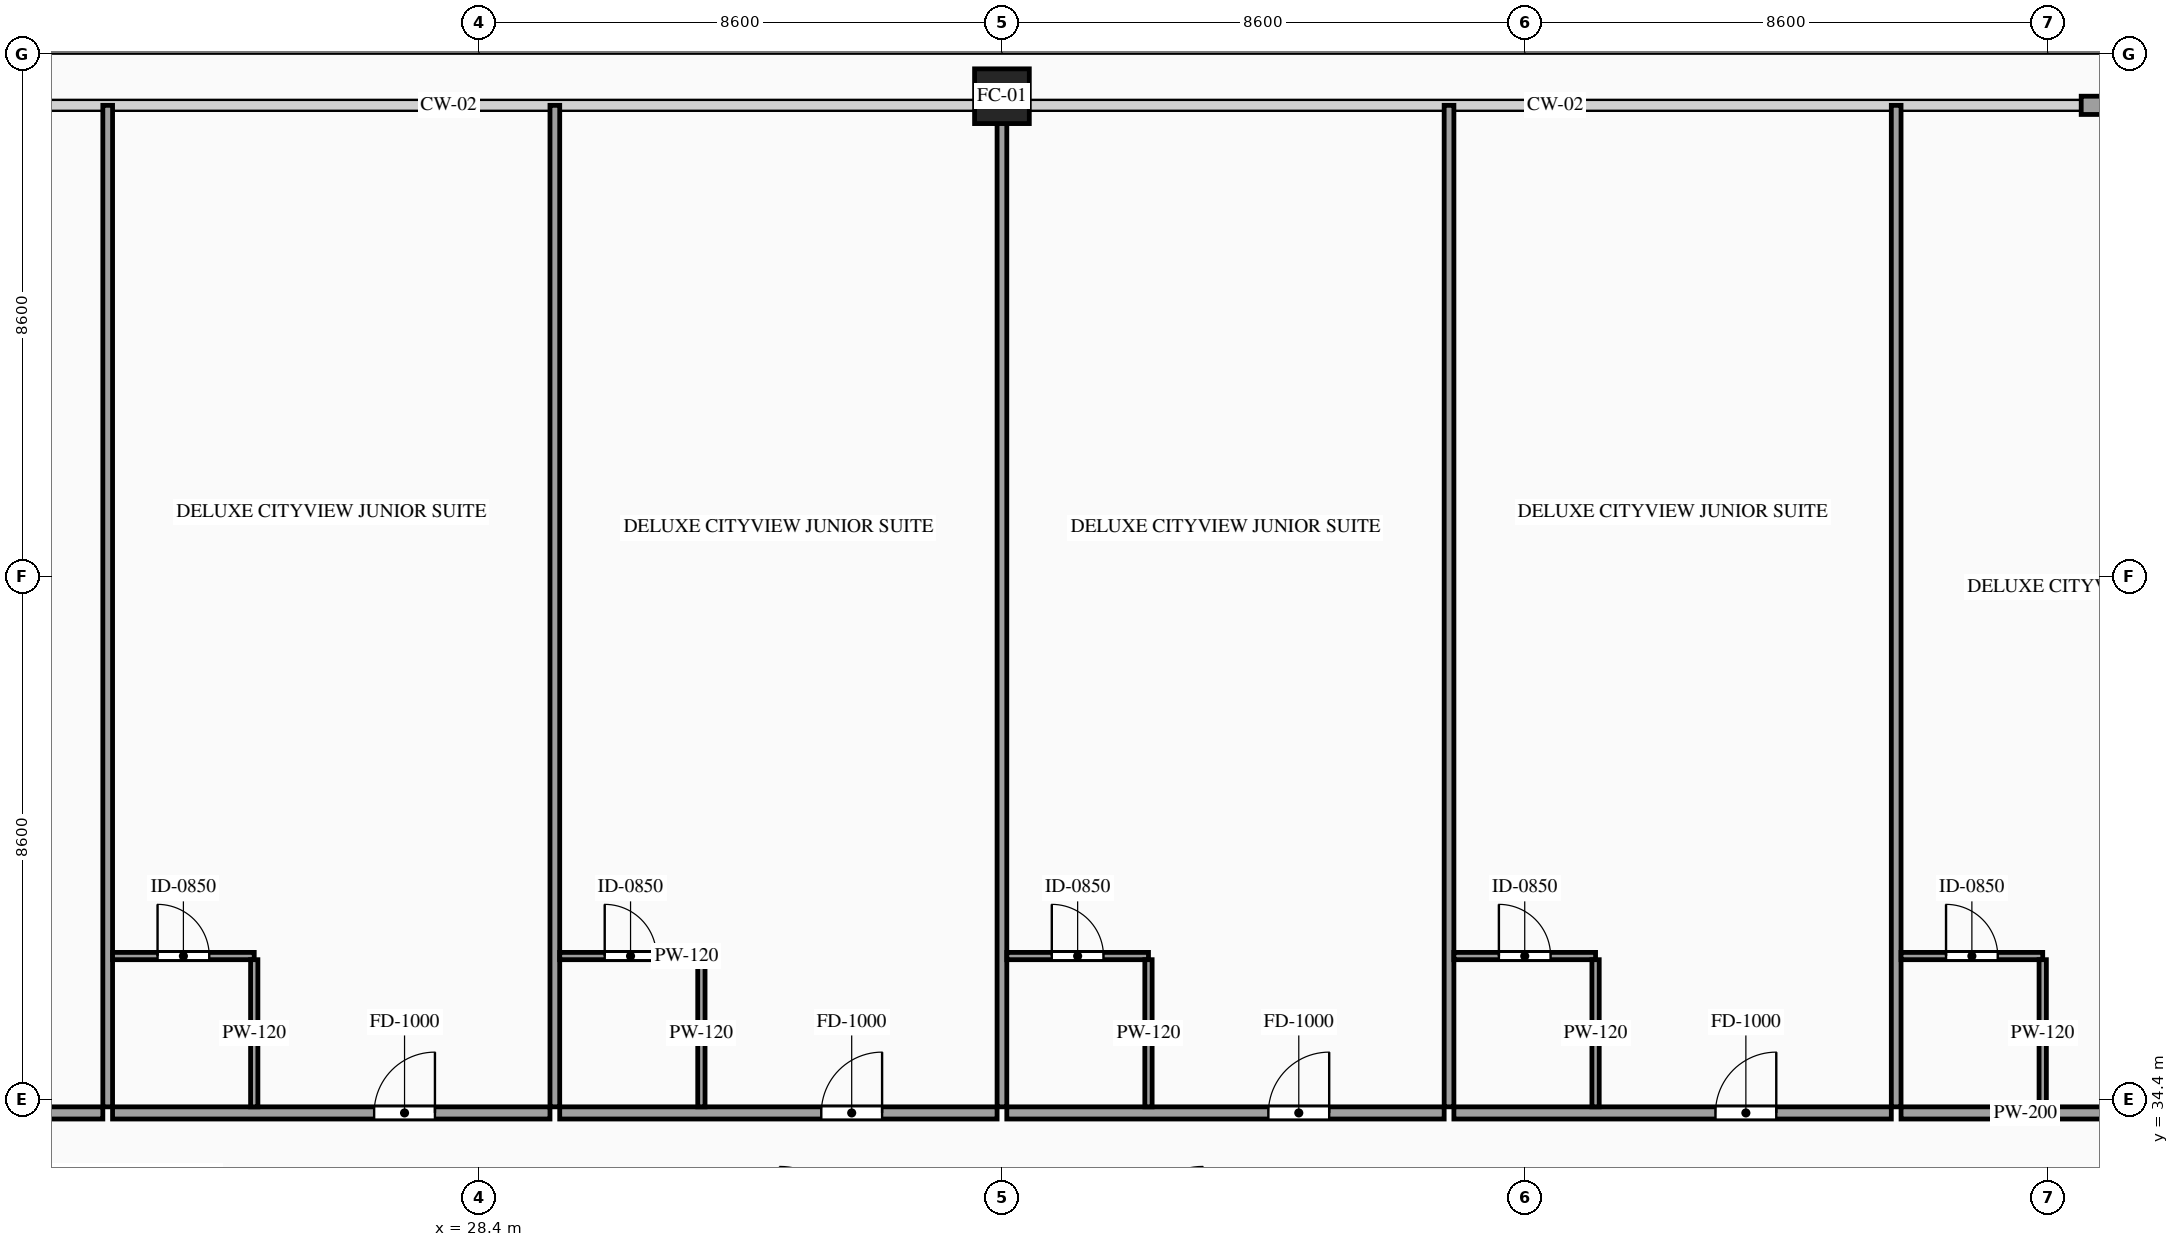
"""IFC4 building model, lengths in metres.
Left out: names, types, materials, properties, quantities, classifications, styles, units other than length and angle.
Written with IfcOpenShell. Run it as: python <this file> out.ifc"""

import sys

from ifc_helpers import new_model, si_unit, direction, frame, frame_2d, origin, origin_2d, place, context, subcontext, project, spatial, rectangle, hollow_rectangle, extrude, source, transform, mapped, element, fill, save


model = new_model("IFC4")
c1 = context("Model", 3, precision=1e-05, world=origin(), true_north=direction((0.0, 1.0)))
c2 = subcontext(c1, "Body", "Model", "MODEL_VIEW")
j1 = project(units=[si_unit("LENGTHUNIT", "METRE"), si_unit("PLANEANGLEUNIT", "RADIAN")], contexts=[c1])
p1 = place(None, origin())
s1 = spatial("IfcSite", under=j1, at=p1, CompositionType="ELEMENT")
p2 = place(p1, origin())
s2 = spatial("IfcBuilding", under=s1, at=p2, CompositionType="ELEMENT")
p3 = place(p2, frame((0.0, 0.0, 37.8)))
s3 = spatial("IfcBuildingStorey", under=s2, at=p3, CompositionType="ELEMENT", Elevation=37.8)
m1 = source(origin(), c2, "Body", "SweptSolid", [
    extrude(hollow_rectangle(XDim=0.9, YDim=0.9, WallThickness=0.042, at=origin_2d()), origin(), (0.0, 0.0, 1.0), 3.6),
])
p4 = place(p3, frame((37.0, 50.9, 0.0), z_axis=(0.0, 0.0, 1.0), x_axis=(1.0, 0.0, 0.0)))
e1 = element("IfcColumn", 1, at=p4, inside=s3, PredefinedType="COLUMN", context=c2, shape_type="MappedRepresentation", body=[
    mapped(m1, transform((0.0, 0.0, 0.0), scale=1.0)),
])
m2 = source(origin(), c2, "Body", "SweptSolid", [
    extrude(rectangle(XDim=2.85, YDim=0.3, at=frame_2d((1.425, 0.0))), origin(), (0.0, 0.0, 1.0), 2.715),
])
p5 = place(p3, frame((54.75, 50.75, 0.0), z_axis=(0.0, 0.0, 1.0), x_axis=(1.0, 0.0, 0.0)))
e2 = element("IfcWall", 2, at=p5, inside=s3, PredefinedType="SOLIDWALL", context=c2, shape_type="MappedRepresentation", body=[
    mapped(m2, transform((0.0, 0.0, 0.0), scale=1.0)),
])
p6 = place(p3, frame((14.94, 34.18, 0.0), z_axis=(0.0, 0.0, 1.0), x_axis=(1.0, 0.0, 0.0)))
e3 = element("IfcWall", 3, at=p6, inside=s3, PredefinedType="PARTITIONING", context=c2, shape_type="SweptSolid", body=[
    extrude(rectangle(XDim=7.273, YDim=0.2, at=frame_2d((3.636, 0.0))), origin(), (0.0, 0.0, 1.0), 3.32),
])
p7 = place(p6, frame((4.342, 0.0, 0.0)))
e4 = element("IfcOpeningElement", 4, at=p7, cuts=e3, PredefinedType="OPENING", context=c2, shape_type="SweptSolid", body=[
    extrude(rectangle(XDim=1.0, YDim=2.2, at=frame_2d((0.5, 1.1))), frame((0.0, 0.115, 0.0), z_axis=(0.0, -1.0, 0.0), x_axis=(1.0, 0.0, 0.0)), (0.0, 0.0, 1.0), 0.23),
])
m3 = source(origin(), c2, "Body", "SweptSolid", [
    extrude(rectangle(XDim=16.47, YDim=0.16, at=frame_2d((8.235, 0.0))), origin(), (0.0, 0.0, 1.0), 3.32),
])
p8 = place(p3, frame((22.293, 34.28, 0.0), z_axis=(0.0, 0.0, 1.0), x_axis=(0.0, 1.0, 0.0)))
e5 = element("IfcWall", 5, at=p8, inside=s3, PredefinedType="PARTITIONING", context=c2, shape_type="MappedRepresentation", body=[
    mapped(m3, transform((0.0, 0.0, 0.0), scale=1.0)),
])
p9 = place(p3, frame((22.373, 34.18, 0.0), z_axis=(0.0, 0.0, 1.0), x_axis=(1.0, 0.0, 0.0)))
e6 = element("IfcWall", 6, at=p9, inside=s3, PredefinedType="PARTITIONING", context=c2, shape_type="SweptSolid", body=[
    extrude(rectangle(XDim=7.194, YDim=0.2, at=frame_2d((3.597, 0.0))), origin(), (0.0, 0.0, 1.0), 3.32),
])
p10 = place(p9, frame((4.302, 0.0, 0.0)))
e7 = element("IfcOpeningElement", 7, at=p10, cuts=e6, PredefinedType="OPENING", context=c2, shape_type="SweptSolid", body=[
    extrude(rectangle(XDim=1.0, YDim=2.2, at=frame_2d((0.5, 1.1))), frame((0.0, 0.115, 0.0), z_axis=(0.0, -1.0, 0.0), x_axis=(1.0, 0.0, 0.0)), (0.0, 0.0, 1.0), 0.23),
])
p11 = place(p3, frame((29.647, 34.28, 0.0), z_axis=(0.0, 0.0, 1.0), x_axis=(0.0, 1.0, 0.0)))
e8 = element("IfcWall", 8, at=p11, inside=s3, PredefinedType="PARTITIONING", context=c2, shape_type="MappedRepresentation", body=[
    mapped(m3, transform((0.0, 0.0, 0.0), scale=1.0)),
])
p12 = place(p3, frame((22.373, 36.76, 0.0), z_axis=(0.0, 0.0, 1.0), x_axis=(1.0, 0.0, 0.0)))
e9 = element("IfcWall", 9, at=p12, inside=s3, PredefinedType="PARTITIONING", context=c2, shape_type="SweptSolid", body=[
    extrude(rectangle(XDim=2.33, YDim=0.12, at=frame_2d((1.165, 0.0))), origin(), (0.0, 0.0, 1.0), 3.32),
])
p13 = place(p12, frame((0.74, 0.0, 0.0)))
e10 = element("IfcOpeningElement", 10, at=p13, cuts=e9, PredefinedType="OPENING", context=c2, shape_type="SweptSolid", body=[
    extrude(rectangle(XDim=0.85, YDim=2.1, at=frame_2d((0.425, 1.05))), frame((0.0, 0.075, 0.0), z_axis=(0.0, -1.0, 0.0), x_axis=(1.0, 0.0, 0.0)), (0.0, 0.0, 1.0), 0.15),
])
m4 = source(origin(), c2, "Body", "SweptSolid", [
    extrude(rectangle(XDim=2.42, YDim=0.12, at=frame_2d((1.21, 0.0))), origin(), (0.0, 0.0, 1.0), 3.32),
])
p14 = place(p3, frame((24.703, 34.28, 0.0), z_axis=(0.0, 0.0, 1.0), x_axis=(0.0, 1.0, 0.0)))
e11 = element("IfcWall", 11, at=p14, inside=s3, PredefinedType="PARTITIONING", context=c2, shape_type="MappedRepresentation", body=[
    mapped(m4, transform((0.0, 0.0, 0.0), scale=1.0)),
])
p15 = place(p3, frame((29.727, 34.18, 0.0), z_axis=(0.0, 0.0, 1.0), x_axis=(1.0, 0.0, 0.0)))
e12 = element("IfcWall", 12, at=p15, inside=s3, PredefinedType="PARTITIONING", context=c2, shape_type="SweptSolid", body=[
    extrude(rectangle(XDim=7.193, YDim=0.2, at=frame_2d((3.596, 0.0))), origin(), (0.0, 0.0, 1.0), 3.32),
])
p16 = place(p15, frame((4.302, 0.0, 0.0)))
e13 = element("IfcOpeningElement", 13, at=p16, cuts=e12, PredefinedType="OPENING", context=c2, shape_type="SweptSolid", body=[
    extrude(rectangle(XDim=1.0, YDim=2.2, at=frame_2d((0.5, 1.1))), frame((0.0, 0.115, 0.0), z_axis=(0.0, -1.0, 0.0), x_axis=(1.0, 0.0, 0.0)), (0.0, 0.0, 1.0), 0.23),
])
m5 = source(origin(), c2, "Body", "SweptSolid", [
    extrude(rectangle(XDim=16.47, YDim=0.16, at=frame_2d((8.235, 0.0))), origin(), (0.0, 0.0, 1.0), 2.515),
])
p17 = place(p3, frame((37.0, 34.28, 0.0), z_axis=(0.0, 0.0, 1.0), x_axis=(0.0, 1.0, 0.0)))
e14 = element("IfcWall", 14, at=p17, inside=s3, PredefinedType="PARTITIONING", context=c2, shape_type="MappedRepresentation", body=[
    mapped(m5, transform((0.0, 0.0, 0.0), scale=1.0)),
])
p18 = place(p3, frame((29.727, 36.76, 0.0), z_axis=(0.0, 0.0, 1.0), x_axis=(1.0, 0.0, 0.0)))
e15 = element("IfcWall", 15, at=p18, inside=s3, PredefinedType="PARTITIONING", context=c2, shape_type="SweptSolid", body=[
    extrude(rectangle(XDim=2.33, YDim=0.12, at=frame_2d((1.165, 0.0))), origin(), (0.0, 0.0, 1.0), 3.32),
])
p19 = place(p18, frame((0.74, 0.0, 0.0)))
e16 = element("IfcOpeningElement", 16, at=p19, cuts=e15, PredefinedType="OPENING", context=c2, shape_type="SweptSolid", body=[
    extrude(rectangle(XDim=0.85, YDim=2.1, at=frame_2d((0.425, 1.05))), frame((0.0, 0.075, 0.0), z_axis=(0.0, -1.0, 0.0), x_axis=(1.0, 0.0, 0.0)), (0.0, 0.0, 1.0), 0.15),
])
p20 = place(p3, frame((32.057, 34.28, 0.0), z_axis=(0.0, 0.0, 1.0), x_axis=(0.0, 1.0, 0.0)))
e17 = element("IfcWall", 17, at=p20, inside=s3, PredefinedType="PARTITIONING", context=c2, shape_type="MappedRepresentation", body=[
    mapped(m4, transform((0.0, 0.0, 0.0), scale=1.0)),
])
p21 = place(p3, frame((37.08, 34.18, 0.0), z_axis=(0.0, 0.0, 1.0), x_axis=(1.0, 0.0, 0.0)))
e18 = element("IfcWall", 18, at=p21, inside=s3, PredefinedType="PARTITIONING", context=c2, shape_type="SweptSolid", body=[
    extrude(rectangle(XDim=7.193, YDim=0.2, at=frame_2d((3.596, 0.0))), origin(), (0.0, 0.0, 1.0), 3.32),
])
p22 = place(p21, frame((4.302, 0.0, 0.0)))
e19 = element("IfcOpeningElement", 19, at=p22, cuts=e18, PredefinedType="OPENING", context=c2, shape_type="SweptSolid", body=[
    extrude(rectangle(XDim=1.0, YDim=2.2, at=frame_2d((0.5, 1.1))), frame((0.0, 0.115, 0.0), z_axis=(0.0, -1.0, 0.0), x_axis=(1.0, 0.0, 0.0)), (0.0, 0.0, 1.0), 0.23),
])
p23 = place(p3, frame((44.353, 34.28, 0.0), z_axis=(0.0, 0.0, 1.0), x_axis=(0.0, 1.0, 0.0)))
e20 = element("IfcWall", 20, at=p23, inside=s3, PredefinedType="PARTITIONING", context=c2, shape_type="MappedRepresentation", body=[
    mapped(m3, transform((0.0, 0.0, 0.0), scale=1.0)),
])
p24 = place(p3, frame((37.08, 36.76, 0.0), z_axis=(0.0, 0.0, 1.0), x_axis=(1.0, 0.0, 0.0)))
e21 = element("IfcWall", 21, at=p24, inside=s3, PredefinedType="PARTITIONING", context=c2, shape_type="SweptSolid", body=[
    extrude(rectangle(XDim=2.33, YDim=0.12, at=frame_2d((1.165, 0.0))), origin(), (0.0, 0.0, 1.0), 3.32),
])
p25 = place(p24, frame((0.74, 0.0, 0.0)))
e22 = element("IfcOpeningElement", 22, at=p25, cuts=e21, PredefinedType="OPENING", context=c2, shape_type="SweptSolid", body=[
    extrude(rectangle(XDim=0.85, YDim=2.1, at=frame_2d((0.425, 1.05))), frame((0.0, 0.075, 0.0), z_axis=(0.0, -1.0, 0.0), x_axis=(1.0, 0.0, 0.0)), (0.0, 0.0, 1.0), 0.15),
])
p26 = place(p3, frame((39.41, 34.28, 0.0), z_axis=(0.0, 0.0, 1.0), x_axis=(0.0, 1.0, 0.0)))
e23 = element("IfcWall", 23, at=p26, inside=s3, PredefinedType="PARTITIONING", context=c2, shape_type="MappedRepresentation", body=[
    mapped(m4, transform((0.0, 0.0, 0.0), scale=1.0)),
])
p27 = place(p3, frame((44.433, 34.18, 0.0), z_axis=(0.0, 0.0, 1.0), x_axis=(1.0, 0.0, 0.0)))
e24 = element("IfcWall", 24, at=p27, inside=s3, PredefinedType="PARTITIONING", context=c2, shape_type="SweptSolid", body=[
    extrude(rectangle(XDim=7.194, YDim=0.2, at=frame_2d((3.597, 0.0))), origin(), (0.0, 0.0, 1.0), 3.32),
])
p28 = place(p27, frame((4.302, 0.0, 0.0)))
e25 = element("IfcOpeningElement", 25, at=p28, cuts=e24, PredefinedType="OPENING", context=c2, shape_type="SweptSolid", body=[
    extrude(rectangle(XDim=1.0, YDim=2.2, at=frame_2d((0.5, 1.1))), frame((0.0, 0.115, 0.0), z_axis=(0.0, -1.0, 0.0), x_axis=(1.0, 0.0, 0.0)), (0.0, 0.0, 1.0), 0.23),
])
p29 = place(p3, frame((51.707, 34.28, 0.0), z_axis=(0.0, 0.0, 1.0), x_axis=(0.0, 1.0, 0.0)))
e26 = element("IfcWall", 26, at=p29, inside=s3, PredefinedType="PARTITIONING", context=c2, shape_type="MappedRepresentation", body=[
    mapped(m3, transform((0.0, 0.0, 0.0), scale=1.0)),
])
p30 = place(p3, frame((44.433, 36.76, 0.0), z_axis=(0.0, 0.0, 1.0), x_axis=(1.0, 0.0, 0.0)))
e27 = element("IfcWall", 27, at=p30, inside=s3, PredefinedType="PARTITIONING", context=c2, shape_type="SweptSolid", body=[
    extrude(rectangle(XDim=2.33, YDim=0.12, at=frame_2d((1.165, 0.0))), origin(), (0.0, 0.0, 1.0), 3.32),
])
p31 = place(p30, frame((0.74, 0.0, 0.0)))
e28 = element("IfcOpeningElement", 28, at=p31, cuts=e27, PredefinedType="OPENING", context=c2, shape_type="SweptSolid", body=[
    extrude(rectangle(XDim=0.85, YDim=2.1, at=frame_2d((0.425, 1.05))), frame((0.0, 0.075, 0.0), z_axis=(0.0, -1.0, 0.0), x_axis=(1.0, 0.0, 0.0)), (0.0, 0.0, 1.0), 0.15),
])
p32 = place(p3, frame((46.763, 34.28, 0.0), z_axis=(0.0, 0.0, 1.0), x_axis=(0.0, 1.0, 0.0)))
e29 = element("IfcWall", 29, at=p32, inside=s3, PredefinedType="PARTITIONING", context=c2, shape_type="MappedRepresentation", body=[
    mapped(m4, transform((0.0, 0.0, 0.0), scale=1.0)),
])
p33 = place(p3, frame((51.787, 34.18, 0.0), z_axis=(0.0, 0.0, 1.0), x_axis=(1.0, 0.0, 0.0)))
e30 = element("IfcWall", 30, at=p33, inside=s3, PredefinedType="PARTITIONING", context=c2, shape_type="SweptSolid", body=[
    extrude(rectangle(XDim=7.273, YDim=0.2, at=frame_2d((3.636, 0.0))), origin(), (0.0, 0.0, 1.0), 3.32),
])
p34 = place(p33, frame((4.342, 0.0, 0.0)))
e31 = element("IfcOpeningElement", 31, at=p34, cuts=e30, PredefinedType="OPENING", context=c2, shape_type="SweptSolid", body=[
    extrude(rectangle(XDim=1.0, YDim=2.2, at=frame_2d((0.5, 1.1))), frame((0.0, 0.115, 0.0), z_axis=(0.0, -1.0, 0.0), x_axis=(1.0, 0.0, 0.0)), (0.0, 0.0, 1.0), 0.23),
])
p35 = place(p3, frame((51.787, 36.76, 0.0), z_axis=(0.0, 0.0, 1.0), x_axis=(1.0, 0.0, 0.0)))
e32 = element("IfcWall", 32, at=p35, inside=s3, PredefinedType="PARTITIONING", context=c2, shape_type="SweptSolid", body=[
    extrude(rectangle(XDim=2.33, YDim=0.12, at=frame_2d((1.165, 0.0))), origin(), (0.0, 0.0, 1.0), 3.32),
])
p36 = place(p35, frame((0.74, 0.0, 0.0)))
e33 = element("IfcOpeningElement", 33, at=p36, cuts=e32, PredefinedType="OPENING", context=c2, shape_type="SweptSolid", body=[
    extrude(rectangle(XDim=0.85, YDim=2.1, at=frame_2d((0.425, 1.05))), frame((0.0, 0.075, 0.0), z_axis=(0.0, -1.0, 0.0), x_axis=(1.0, 0.0, 0.0)), (0.0, 0.0, 1.0), 0.15),
])
p37 = place(p3, frame((54.117, 34.28, 0.0), z_axis=(0.0, 0.0, 1.0), x_axis=(0.0, 1.0, 0.0)))
e34 = element("IfcWall", 34, at=p37, inside=s3, PredefinedType="PARTITIONING", context=c2, shape_type="MappedRepresentation", body=[
    mapped(m4, transform((0.0, 0.0, 0.0), scale=1.0)),
])
m6 = source(origin(), c2, "Body", "SweptSolid", [
    extrude(rectangle(XDim=1.0, YDim=2.2, at=frame_2d((0.5, 1.1))), frame((0.0, 0.025, 0.0), z_axis=(0.0, -1.0, 0.0), x_axis=(1.0, 0.0, 0.0)), (0.0, 0.0, 1.0), 0.05),
])
p38 = place(p10, origin())
e35 = element("IfcDoor", 35, at=p38, inside=s3, OperationType="SINGLE_SWING_RIGHT", PredefinedType="DOOR", context=c2, shape_type="MappedRepresentation", body=[
    mapped(m6, transform((0.0, 0.0, 0.0), scale=1.0)),
])
fill(e7, e35)
m7 = source(origin(), c2, "Body", "SweptSolid", [
    extrude(rectangle(XDim=0.85, YDim=2.1, at=frame_2d((0.425, 1.05))), frame((0.0, 0.025, 0.0), z_axis=(0.0, -1.0, 0.0), x_axis=(1.0, 0.0, 0.0)), (0.0, 0.0, 1.0), 0.05),
])
p39 = place(p13, origin())
e36 = element("IfcDoor", 36, at=p39, inside=s3, OperationType="SINGLE_SWING_LEFT", PredefinedType="DOOR", context=c2, shape_type="MappedRepresentation", body=[
    mapped(m7, transform((0.0, 0.0, 0.0), scale=1.0)),
])
fill(e10, e36)
p40 = place(p16, origin())
e37 = element("IfcDoor", 37, at=p40, inside=s3, OperationType="SINGLE_SWING_RIGHT", PredefinedType="DOOR", context=c2, shape_type="MappedRepresentation", body=[
    mapped(m6, transform((0.0, 0.0, 0.0), scale=1.0)),
])
fill(e13, e37)
p41 = place(p19, origin())
e38 = element("IfcDoor", 38, at=p41, inside=s3, OperationType="SINGLE_SWING_LEFT", PredefinedType="DOOR", context=c2, shape_type="MappedRepresentation", body=[
    mapped(m7, transform((0.0, 0.0, 0.0), scale=1.0)),
])
fill(e16, e38)
p42 = place(p22, origin())
e39 = element("IfcDoor", 39, at=p42, inside=s3, OperationType="SINGLE_SWING_RIGHT", PredefinedType="DOOR", context=c2, shape_type="MappedRepresentation", body=[
    mapped(m6, transform((0.0, 0.0, 0.0), scale=1.0)),
])
fill(e19, e39)
p43 = place(p25, origin())
e40 = element("IfcDoor", 40, at=p43, inside=s3, OperationType="SINGLE_SWING_LEFT", PredefinedType="DOOR", context=c2, shape_type="MappedRepresentation", body=[
    mapped(m7, transform((0.0, 0.0, 0.0), scale=1.0)),
])
fill(e22, e40)
p44 = place(p28, origin())
e41 = element("IfcDoor", 41, at=p44, inside=s3, OperationType="SINGLE_SWING_RIGHT", PredefinedType="DOOR", context=c2, shape_type="MappedRepresentation", body=[
    mapped(m6, transform((0.0, 0.0, 0.0), scale=1.0)),
])
fill(e25, e41)
p45 = place(p31, origin())
e42 = element("IfcDoor", 42, at=p45, inside=s3, OperationType="SINGLE_SWING_LEFT", PredefinedType="DOOR", context=c2, shape_type="MappedRepresentation", body=[
    mapped(m7, transform((0.0, 0.0, 0.0), scale=1.0)),
])
fill(e28, e42)
p46 = place(p36, origin())
e43 = element("IfcDoor", 43, at=p46, inside=s3, OperationType="SINGLE_SWING_LEFT", PredefinedType="DOOR", context=c2, shape_type="MappedRepresentation", body=[
    mapped(m7, transform((0.0, 0.0, 0.0), scale=1.0)),
])
fill(e33, e43)
save(model, sys.argv[1])
